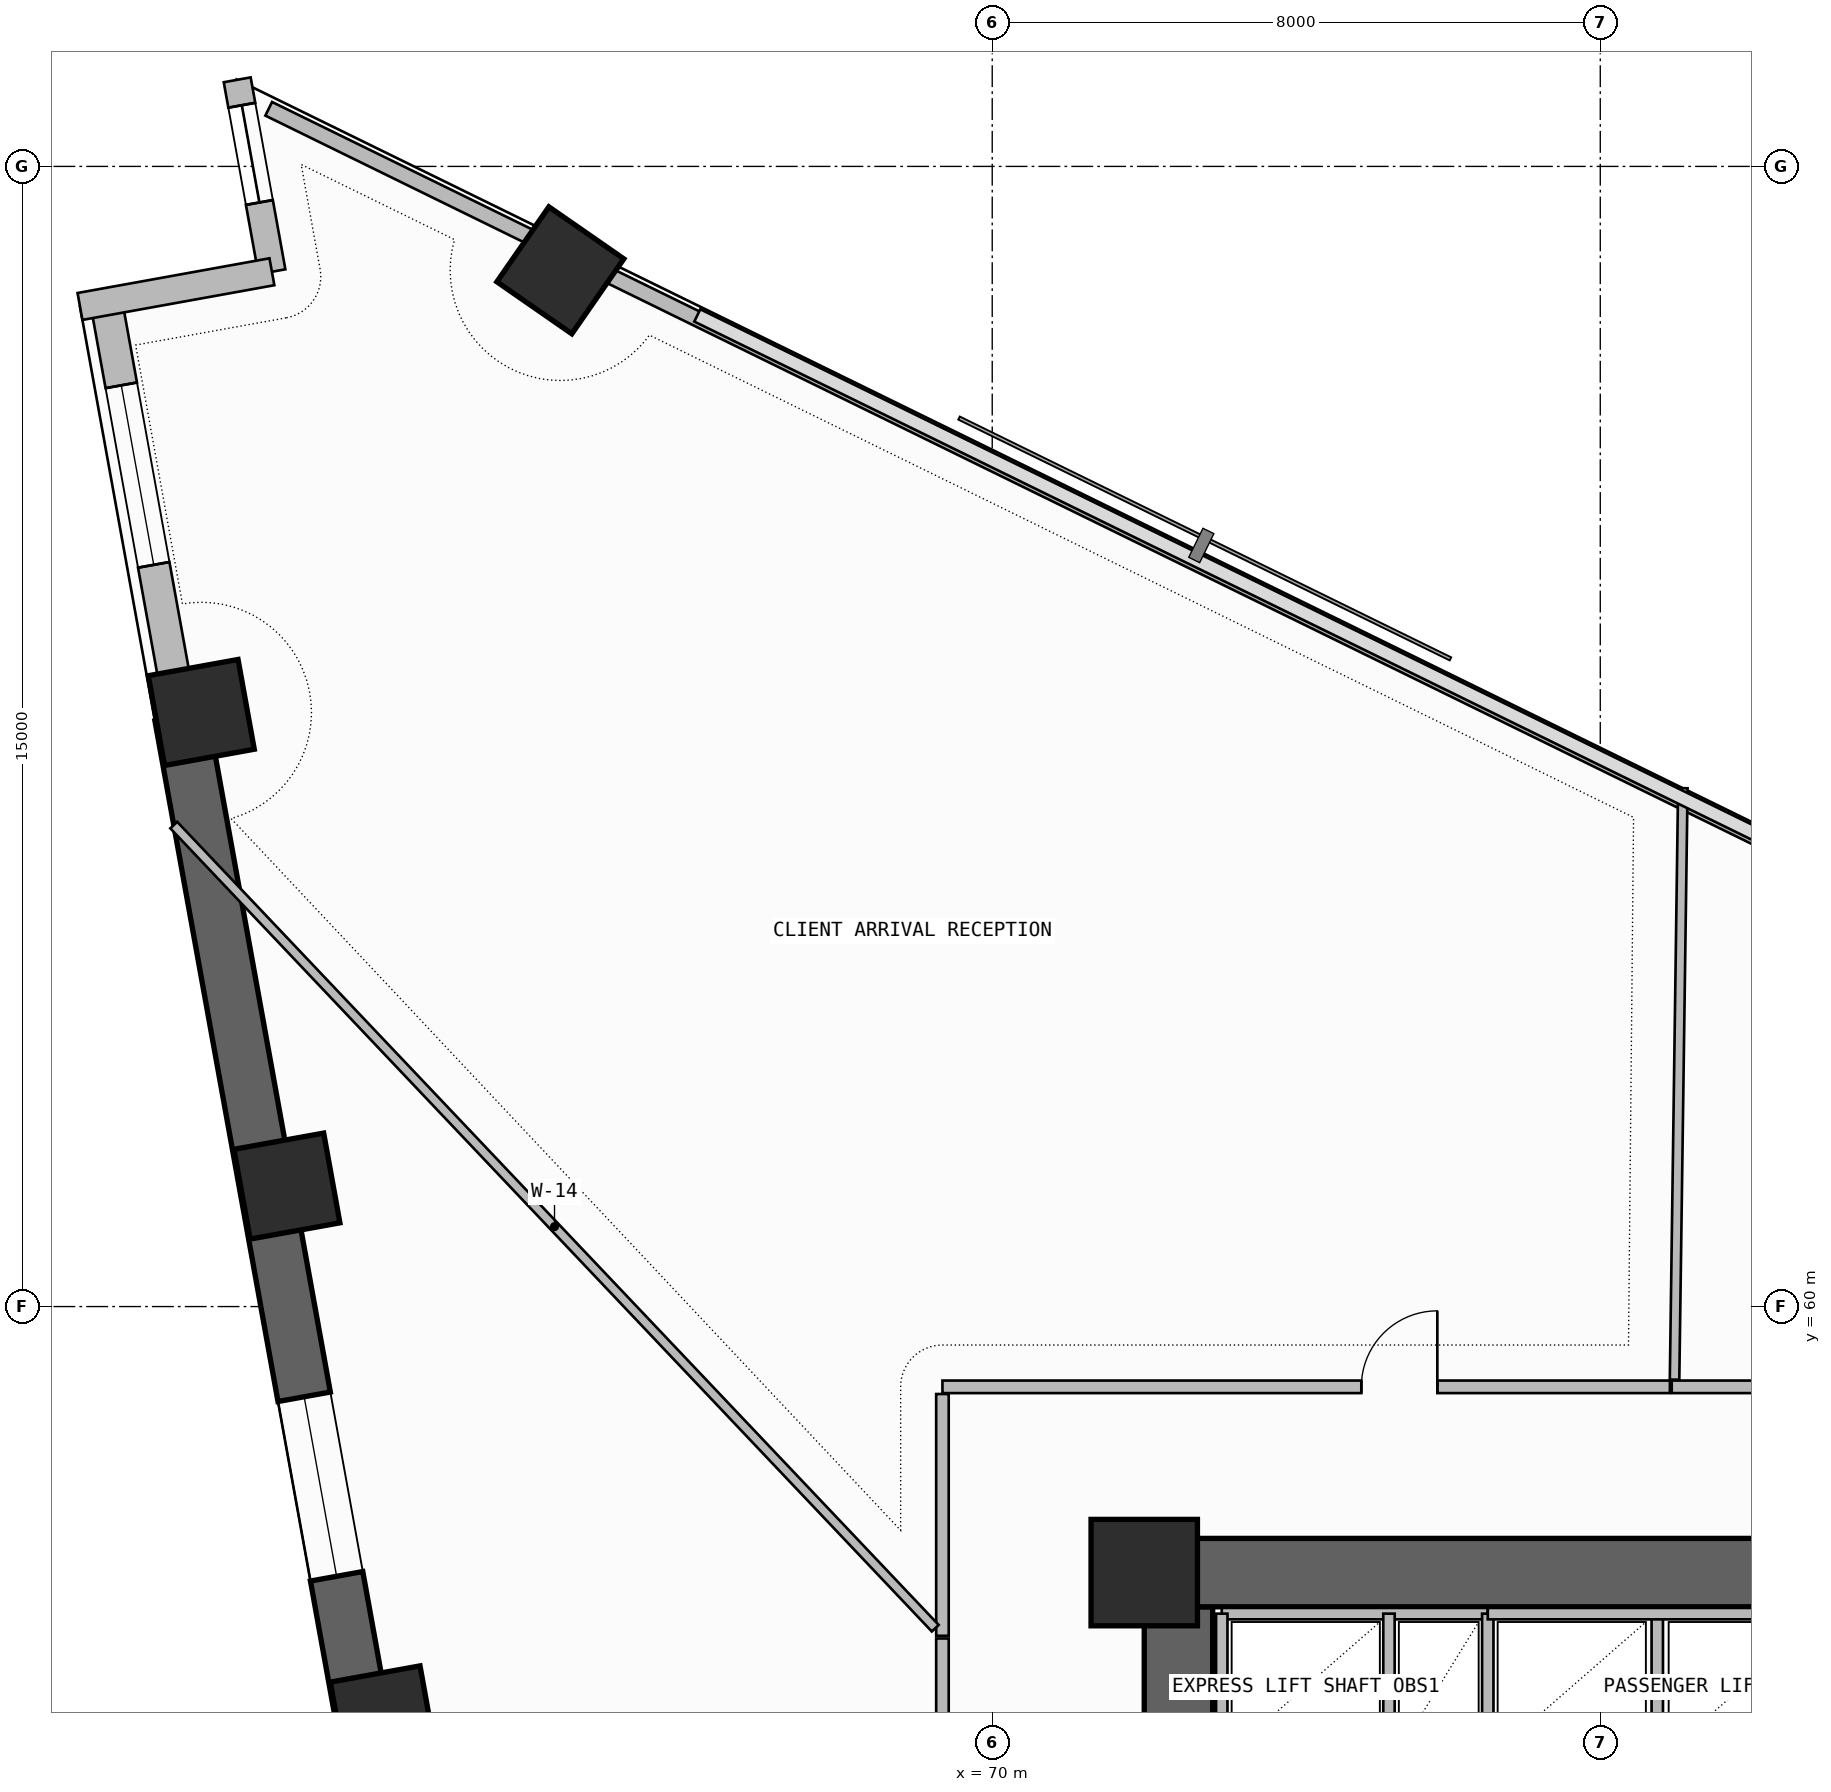
"""IFC4 building model, lengths in metres.
Left out: names, types, materials, properties, quantities, classifications, styles, units other than length and angle.
Written with IfcOpenShell. Run it as: python <this file> out.ifc"""

import sys

from ifc_helpers import new_model, si_unit, direction, frame, frame_2d, origin, origin_2d, place, context, subcontext, project, spatial, rectangle, extrude, element, fill, save


model = new_model("IFC4")
c1 = context("Model", 3, precision=1e-05, world=origin(), true_north=direction((0.0, 1.0)))
c2 = subcontext(c1, "Body", "Model", "MODEL_VIEW")
j1 = project(units=[si_unit("LENGTHUNIT", "METRE"), si_unit("PLANEANGLEUNIT", "RADIAN")], contexts=[c1])
p1 = place(None, origin())
s1 = spatial("IfcSite", under=j1, at=p1, CompositionType="ELEMENT")
p2 = place(p1, origin())
s2 = spatial("IfcBuilding", under=s1, at=p2, CompositionType="ELEMENT")
p3 = place(p2, frame((0.0, 0.0, 117.3)))
s3 = spatial("IfcBuildingStorey", under=s2, at=p3, CompositionType="ELEMENT", Elevation=117.3)
p4 = place(p3, frame((72.45, 43.35, -0.26), z_axis=(0.0, 0.0, 1.0), x_axis=(0.0, 1.0, 0.0)))
e1 = element("IfcWall", 1, at=p4, inside=s3, PredefinedType="SHEAR", context=c2, shape_type="SweptSolid", body=[
    extrude(rectangle(XDim=12.7, YDim=0.9, at=frame_2d((6.35, 0.0))), origin(), (0.0, 0.0, 1.0), 3.6),
])
p5 = place(p4, frame((1.35, 0.0, 0.26)))
e2 = element("IfcOpeningElement", 2, at=p5, cuts=e1, PredefinedType="OPENING", context=c2, shape_type="SweptSolid", body=[
    extrude(rectangle(XDim=1.2, YDim=2.2, at=frame_2d((0.6, 1.1))), frame((0.0, 0.46, 0.0), z_axis=(0.0, -1.0, 0.0), x_axis=(1.0, 0.0, 0.0)), (0.0, 0.0, 1.0), 0.92),
])
p6 = place(p3, frame((72.0, 56.5, -0.26), z_axis=(0.0, 0.0, 1.0), x_axis=(1.0, 0.0, 0.0)))
e3 = element("IfcWall", 3, at=p6, inside=s3, PredefinedType="SHEAR", context=c2, shape_type="SweptSolid", body=[
    extrude(rectangle(XDim=13.9, YDim=0.9, at=frame_2d((6.95, 0.0))), origin(), (0.0, 0.0, 1.0), 3.6),
])
p7 = place(p3, frame((72.0, 56.5, 0.0), z_axis=(0.0, 0.0, 1.0), x_axis=(1.0, 0.0, 0.0)))
e4 = element("IfcColumn", 4, at=p7, inside=s3, PredefinedType="COLUMN", context=c2, shape_type="SweptSolid", body=[
    extrude(rectangle(XDim=1.4, YDim=1.4, at=origin_2d()), origin(), (0.0, 0.0, 1.0), 3.6),
])
for number, where, z_axis, x_axis in (
    (5, (64.318, 73.633, 0.0), (0.0, 0.0, 1.0), (0.57, 0.822, 0.0)),
    (6, (59.594, 67.816, 0.0), (0.0, 0.0, 1.0), (-0.178, 0.984, 0.0)),
    (7, (60.72, 61.585, 0.0), (0.0, 0.0, 1.0), (-0.178, 0.984, 0.0)),
    (8, (61.988, 54.575, 0.0), (0.0, 0.0, 1.0), (-0.178, 0.984, 0.0)),
):
    element("IfcColumn", number, at=place(p3, frame(where, z_axis=z_axis, x_axis=x_axis)), inside=s3, PredefinedType="COLUMN", context=c2, shape_type="SweptSolid", body=[
        extrude(rectangle(XDim=1.2, YDim=1.2, at=origin_2d()), origin(), (0.0, 0.0, 1.0), 3.6),
    ])
p8 = place(p3, frame((58.342, 73.22, 0.0), z_axis=(0.0, 0.0, 1.0), x_axis=(0.177981837245, -0.984033772597, 0.0)))
e9 = element("IfcWall", 9, at=p8, inside=s3, PredefinedType="SOLIDWALL", context=c2, shape_type="SweptSolid", body=[
    extrude(rectangle(XDim=5.54, YDim=0.42, at=frame_2d((2.77, 0.0))), origin(), (0.0, 0.0, 1.0), 2.725),
])
p9 = place(p8, frame((1.118, 0.0, 1.2)))
e10 = element("IfcOpeningElement", 10, at=p9, cuts=e9, PredefinedType="OPENING", context=c2, shape_type="SweptSolid", body=[
    extrude(rectangle(XDim=2.4, YDim=0.9, at=frame_2d((1.2, 0.45))), frame((0.0, 0.22, 0.0), z_axis=(0.0, -1.0, 0.0), x_axis=(1.0, 0.0, 0.0)), (0.0, 0.0, 1.0), 0.44),
])
p10 = place(p3, frame((59.328, 67.768, -0.26), z_axis=(0.0, 0.0, 1.0), x_axis=(0.177933213615, -0.984042565895, 0.0)))
e11 = element("IfcWall", 11, at=p10, inside=s3, PredefinedType="SHEAR", context=c2, shape_type="SweptSolid", body=[
    extrude(rectangle(XDim=20.579, YDim=0.7, at=frame_2d((10.289, 0.0))), origin(), (0.0, 0.0, 1.0), 3.6),
])
p11 = place(p10, frame((9.1, 0.0, 1.2)))
e12 = element("IfcOpeningElement", 12, at=p11, cuts=e11, PredefinedType="OPENING", context=c2, shape_type="SweptSolid", body=[
    extrude(rectangle(XDim=2.4, YDim=0.9, at=frame_2d((1.2, 0.45))), frame((0.0, 0.36, 0.0), z_axis=(0.0, -1.0, 0.0), x_axis=(1.0, 0.0, 0.0)), (0.0, 0.0, 1.0), 0.72),
])
p12 = place(p3, frame((60.066, 76.139, 0.0), z_axis=(0.0, 0.0, 1.0), x_axis=(0.177897493713, -0.984049024048, 0.0)))
e13 = element("IfcWall", 13, at=p12, inside=s3, PredefinedType="SOLIDWALL", context=c2, shape_type="SweptSolid", body=[
    extrude(rectangle(XDim=2.566, YDim=0.36, at=frame_2d((1.283, 0.0))), origin(), (0.0, 0.0, 1.0), 3.34),
])
p13 = place(p12, frame((0.34, 0.0, 0.45)))
e14 = element("IfcOpeningElement", 14, at=p13, cuts=e13, PredefinedType="OPENING", context=c2, shape_type="SweptSolid", body=[
    extrude(rectangle(XDim=1.3, YDim=2.4, at=frame_2d((0.65, 1.2))), frame((0.0, 0.19, 0.0), z_axis=(0.0, -1.0, 0.0), x_axis=(1.0, 0.0, 0.0)), (0.0, 0.0, 1.0), 0.38),
])
p14 = place(p3, frame((60.523, 73.614, 0.0), z_axis=(0.0, 0.0, 1.0), x_axis=(-0.984046012923, -0.177914149102, 0.0)))
e15 = element("IfcWall", 15, at=p14, inside=s3, PredefinedType="SOLIDWALL", context=c2, shape_type="SweptSolid", body=[
    extrude(rectangle(XDim=2.566, YDim=0.36, at=frame_2d((1.283, 0.0))), origin(), (0.0, 0.0, 1.0), 3.34),
])
p15 = place(p3, frame((88.921, 61.823, 0.0), z_axis=(0.0, 0.0, 1.0), x_axis=(-0.897993533426, 0.440008652103, 0.0)))
e16 = element("IfcWall", 16, at=p15, inside=s3, PredefinedType="PARAPET", context=c2, shape_type="SweptSolid", body=[
    extrude(rectangle(XDim=26.864, YDim=0.2, at=frame_2d((13.432, 0.0))), origin(), (0.0, 0.0, 1.0), 1.15),
])
p16 = place(p3, frame((64.032, 74.018, 0.0), z_axis=(0.0, 0.0, 1.0), x_axis=(-0.89799103332, 0.440013754417, 0.0)))
e17 = element("IfcWall", 17, at=p16, inside=s3, PredefinedType="PARAPET", context=c2, shape_type="SweptSolid", body=[
    extrude(rectangle(XDim=3.955, YDim=0.2, at=frame_2d((1.978, 0.0))), origin(), (0.0, 0.0, 1.0), 1.15),
])
p17 = place(p3, frame((73.02, 55.96, 0.0), z_axis=(0.0, 0.0, 1.0), x_axis=(1.0, 0.0, 0.0)))
e18 = element("IfcWall", 18, at=p17, inside=s3, PredefinedType="SOLIDWALL", context=c2, shape_type="SweptSolid", body=[
    extrude(rectangle(XDim=3.5, YDim=0.15, at=frame_2d((1.75, 0.0))), origin(), (0.0, 0.0, 1.0), 3.34),
])
p18 = place(p3, frame((73.02, 54.02, 0.0), z_axis=(0.0, 0.0, 1.0), x_axis=(0.0, 1.0, 0.0)))
e19 = element("IfcWall", 19, at=p18, inside=s3, PredefinedType="PLUMBINGWALL", context=c2, shape_type="SweptSolid", body=[
    extrude(rectangle(XDim=1.94, YDim=0.15, at=frame_2d((0.97, 0.0))), origin(), (0.0, 0.0, 1.0), 3.34),
])
p19 = place(p3, frame((76.52, 54.02, 0.0), z_axis=(0.0, 0.0, 1.0), x_axis=(0.0, 1.0, 0.0)))
e20 = element("IfcWall", 20, at=p19, inside=s3, PredefinedType="SOLIDWALL", context=c2, shape_type="SweptSolid", body=[
    extrude(rectangle(XDim=1.94, YDim=0.15, at=frame_2d((0.97, 0.0))), origin(), (0.0, 0.0, 1.0), 3.34),
])
p20 = place(p3, frame((75.22, 54.02, 0.0), z_axis=(0.0, 0.0, 1.0), x_axis=(0.0, 1.0, 0.0)))
e21 = element("IfcWall", 21, at=p20, inside=s3, PredefinedType="PLUMBINGWALL", context=c2, shape_type="SweptSolid", body=[
    extrude(rectangle(XDim=1.94, YDim=0.15, at=frame_2d((0.97, 0.0))), origin(), (0.0, 0.0, 1.0), 3.34),
])
p21 = place(p3, frame((78.75, 54.02, 0.0), z_axis=(0.0, 0.0, 1.0), x_axis=(0.0, 1.0, 0.0)))
e22 = element("IfcWall", 22, at=p21, inside=s3, PredefinedType="PLUMBINGWALL", context=c2, shape_type="SweptSolid", body=[
    extrude(rectangle(XDim=1.96, YDim=0.15, at=frame_2d((0.98, 0.0))), origin(), (0.0, 0.0, 1.0), 3.34),
])
p22 = place(p3, frame((76.52, 55.96, 0.0), z_axis=(0.0, 0.0, 1.0), x_axis=(1.0, 0.0, 0.0)))
e23 = element("IfcWall", 23, at=p22, inside=s3, PredefinedType="SOLIDWALL", context=c2, shape_type="SweptSolid", body=[
    extrude(rectangle(XDim=6.7, YDim=0.15, at=frame_2d((3.35, 0.0))), origin(), (0.0, 0.0, 1.0), 3.34),
])
p23 = place(p3, frame((91.828, 58.944, 0.0), z_axis=(0.0, 0.0, 1.0), x_axis=(-1.0, 0.0, 0.0)))
e24 = element("IfcWall", 24, at=p23, inside=s3, PredefinedType="PARTITIONING", context=c2, shape_type="SweptSolid", body=[
    extrude(rectangle(XDim=12.888, YDim=0.165, at=frame_2d((6.444, 0.0))), origin(), (0.0, 0.0, 1.0), 2.725),
])
p24 = place(p23, frame((4.221, 0.0, 0.0)))
e25 = element("IfcOpeningElement", 25, at=p24, cuts=e24, PredefinedType="OPENING", context=c2, shape_type="SweptSolid", body=[
    extrude(rectangle(XDim=1.0, YDim=2.2, at=frame_2d((0.5, 1.1))), frame((0.0, 0.093, 0.0), z_axis=(0.0, -1.0, 0.0), x_axis=(1.0, 0.0, 0.0)), (0.0, 0.0, 1.0), 0.185),
])
p25 = place(p3, frame((78.977, 59.039, 0.0), z_axis=(0.0, 0.0, 1.0), x_axis=(0.013992104015, 0.999902105721, 0.0)))
e26 = element("IfcWall", 26, at=p25, inside=s3, PredefinedType="PARTITIONING", context=c2, shape_type="SweptSolid", body=[
    extrude(rectangle(XDim=7.782, YDim=0.125, at=frame_2d((3.891, 0.0))), origin(), (0.0, 0.0, 1.0), 3.34),
])
p26 = place(p3, frame((78.916, 58.944, 0.0), z_axis=(0.0, 0.0, 1.0), x_axis=(-1.0, 0.0, 0.0)))
e27 = element("IfcWall", 27, at=p26, inside=s3, PredefinedType="PARTITIONING", context=c2, shape_type="SweptSolid", body=[
    extrude(rectangle(XDim=9.571, YDim=0.165, at=frame_2d((4.786, 0.0))), origin(), (0.0, 0.0, 1.0), 2.725),
])
p27 = place(p26, frame((3.06, 0.0, 0.0)))
e28 = element("IfcOpeningElement", 28, at=p27, cuts=e27, PredefinedType="OPENING", context=c2, shape_type="SweptSolid", body=[
    extrude(rectangle(XDim=1.0, YDim=2.2, at=frame_2d((0.5, 1.1))), frame((0.0, 0.093, 0.0), z_axis=(0.0, -1.0, 0.0), x_axis=(1.0, 0.0, 0.0)), (0.0, 0.0, 1.0), 0.185),
])
p28 = place(p3, frame((69.345, 58.85, 0.0), z_axis=(0.0, 0.0, 1.0), x_axis=(0.0, -1.0, 0.0)))
e29 = element("IfcWall", 29, at=p28, inside=s3, PredefinedType="PARTITIONING", context=c2, shape_type="SweptSolid", body=[
    extrude(rectangle(XDim=3.181, YDim=0.165, at=frame_2d((1.591, 0.0))), origin(), (0.0, 0.0, 1.0), 2.725),
])
p29 = place(p3, frame((69.25, 55.768, 0.0), z_axis=(0.0, 0.0, 1.0), x_axis=(-0.688078949666, 0.725635830859, 0.0)))
e30 = element("IfcWall", 30, at=p29, inside=s3, PredefinedType="PARTITIONING", context=c2, shape_type="SweptSolid", body=[
    extrude(rectangle(XDim=14.561, YDim=0.125, at=frame_2d((7.281, 0.0))), origin(), (0.0, 0.0, 1.0), 2.725),
])
p30 = place(p3, frame((69.345, 55.633, 0.0), z_axis=(0.0, 0.0, 1.0), x_axis=(0.0, -1.0, 0.0)))
e31 = element("IfcWall", 31, at=p30, inside=s3, PredefinedType="PARTITIONING", context=c2, shape_type="SweptSolid", body=[
    extrude(rectangle(XDim=9.483, YDim=0.165, at=frame_2d((4.742, 0.0))), origin(), (0.0, 0.0, 1.0), 2.725),
])
p31 = place(p30, frame((5.454, 0.0, 0.0)))
e32 = element("IfcOpeningElement", 32, at=p31, cuts=e31, PredefinedType="OPENING", context=c2, shape_type="SweptSolid", body=[
    extrude(rectangle(XDim=1.0, YDim=2.2, at=frame_2d((0.5, 1.1))), frame((0.0, 0.093, 0.0), z_axis=(0.0, -1.0, 0.0), x_axis=(1.0, 0.0, 0.0)), (0.0, 0.0, 1.0), 0.185),
])
p32 = place(p9, origin())
e33 = element("IfcWindow", 33, at=p32, inside=s3, PartitioningType="SINGLE_PANEL", PredefinedType="WINDOW", context=c2, shape_type="SweptSolid", body=[
    extrude(rectangle(XDim=2.4, YDim=0.9, at=frame_2d((1.2, 0.45))), frame((0.0, 0.03, 0.0), z_axis=(0.0, -1.0, 0.0), x_axis=(1.0, 0.0, 0.0)), (0.0, 0.0, 1.0), 0.06),
])
fill(e10, e33)
p33 = place(p11, origin())
e34 = element("IfcWindow", 34, at=p33, inside=s3, PartitioningType="SINGLE_PANEL", PredefinedType="WINDOW", context=c2, shape_type="SweptSolid", body=[
    extrude(rectangle(XDim=2.4, YDim=0.9, at=frame_2d((1.2, 0.45))), frame((0.0, 0.03, 0.0), z_axis=(0.0, -1.0, 0.0), x_axis=(1.0, 0.0, 0.0)), (0.0, 0.0, 1.0), 0.06),
])
fill(e12, e34)
p34 = place(p13, origin())
e35 = element("IfcWindow", 35, at=p34, inside=s3, PartitioningType="SINGLE_PANEL", PredefinedType="WINDOW", context=c2, shape_type="SweptSolid", body=[
    extrude(rectangle(XDim=1.3, YDim=2.4, at=frame_2d((0.65, 1.2))), frame((0.0, 0.03, 0.0), z_axis=(0.0, -1.0, 0.0), x_axis=(1.0, 0.0, 0.0)), (0.0, 0.0, 1.0), 0.06),
])
fill(e14, e35)
p35 = place(p27, frame((1.0, 0.0, 0.0), z_axis=(0.0, 0.0, 1.0), x_axis=(-1.0, 0.0, 0.0)))
e36 = element("IfcDoor", 36, at=p35, inside=s3, OperationType="SINGLE_SWING_RIGHT", PredefinedType="DOOR", context=c2, shape_type="SweptSolid", body=[
    extrude(rectangle(XDim=1.0, YDim=2.2, at=frame_2d((0.5, 1.1))), frame((0.0, 0.025, 0.0), z_axis=(0.0, -1.0, 0.0), x_axis=(1.0, 0.0, 0.0)), (0.0, 0.0, 1.0), 0.05),
])
fill(e28, e36)
save(model, sys.argv[1])
